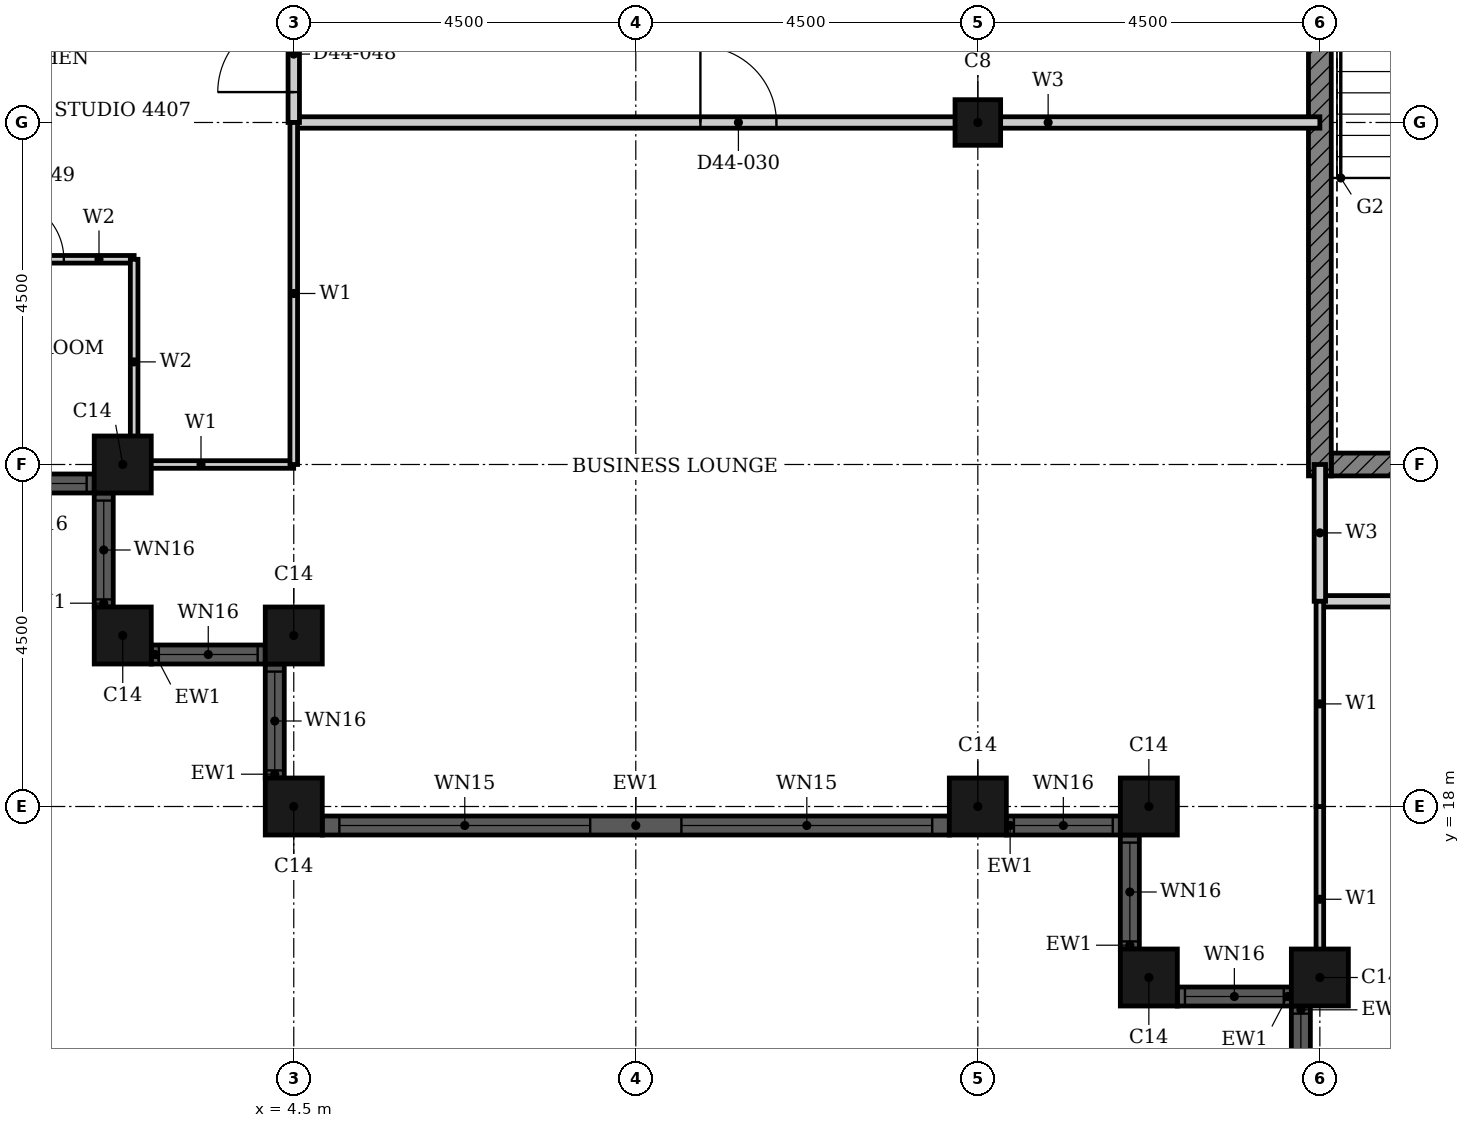
"""IFC4 building model, lengths in metres.
Left out: names, types, materials, properties, quantities, classifications, styles, units other than length and angle.
Written with IfcOpenShell. Run it as: python <this file> out.ifc"""

import sys

from ifc_helpers import new_model, si_unit, direction, frame, frame_2d, origin, origin_2d, place, context, subcontext, project, spatial, rectangle, hollow_rectangle, extrude, element, fill, save


model = new_model("IFC4")
c1 = context("Model", 3, precision=1e-05, world=origin(), true_north=direction((0.0, 1.0)))
c2 = subcontext(c1, "Body", "Model", "MODEL_VIEW")
j1 = project(units=[si_unit("LENGTHUNIT", "METRE"), si_unit("PLANEANGLEUNIT", "RADIAN")], contexts=[c1])
p1 = place(None, origin())
s1 = spatial("IfcSite", under=j1, at=p1, CompositionType="ELEMENT")
p2 = place(p1, origin())
s2 = spatial("IfcBuilding", under=s1, at=p2, CompositionType="ELEMENT")
p3 = place(p2, frame((0.0, 0.0, 176.5)))
s3 = spatial("IfcBuildingStorey", under=s2, at=p3, CompositionType="ELEMENT", Elevation=176.5)
for number, where, z_axis, x_axis in (
    (1, (2.25, 22.5, 0.0), (0.0, 0.0, 1.0), (1.0, 0.0, 0.0)),
    (2, (2.25, 20.25, 0.0), (0.0, 0.0, 1.0), (1.0, 0.0, 0.0)),
    (3, (4.5, 20.25, 0.0), (0.0, 0.0, 1.0), (1.0, 0.0, 0.0)),
    (4, (4.5, 18.0, 0.0), (0.0, 0.0, 1.0), (1.0, 0.0, 0.0)),
    (5, (13.5, 18.0, 0.0), (0.0, 0.0, 1.0), (1.0, 0.0, 0.0)),
    (6, (15.75, 18.0, 0.0), (0.0, 0.0, 1.0), (1.0, 0.0, 0.0)),
    (7, (15.75, 15.75, 0.0), (0.0, 0.0, 1.0), (1.0, 0.0, 0.0)),
    (8, (18.0, 15.75, 0.0), (0.0, 0.0, 1.0), (1.0, 0.0, 0.0)),
):
    element("IfcColumn", number, at=place(p3, frame(where, z_axis=z_axis, x_axis=x_axis)), inside=s3, PredefinedType="COLUMN", context=c2, shape_type="SweptSolid", body=[
        extrude(hollow_rectangle(XDim=0.75, YDim=0.75, WallThickness=0.024, at=origin_2d()), origin(), (0.0, 0.0, 1.0), 3.7),
    ])
p4 = place(p3, frame((13.5, 27.0, 0.0), z_axis=(0.0, 0.0, 1.0), x_axis=(1.0, 0.0, 0.0)))
e9 = element("IfcColumn", 9, at=p4, inside=s3, PredefinedType="COLUMN", context=c2, shape_type="SweptSolid", body=[
    extrude(hollow_rectangle(XDim=0.6, YDim=0.6, WallThickness=0.02, at=origin_2d()), origin(), (0.0, 0.0, 1.0), 3.7),
])
p5 = place(p3, frame((0.375, 22.25, 0.0), z_axis=(0.0, 0.0, 1.0), x_axis=(1.0, 0.0, 0.0)))
e10 = element("IfcWall", 10, at=p5, inside=s3, PredefinedType="SOLIDWALL", context=c2, shape_type="SweptSolid", body=[
    extrude(rectangle(XDim=1.5, YDim=0.25, at=frame_2d((0.75, 0.0))), origin(), (0.0, 0.0, 1.0), 3.7),
])
p6 = place(p5, frame((0.1, 0.0, 0.9)))
e11 = element("IfcOpeningElement", 11, at=p6, cuts=e10, PredefinedType="OPENING", context=c2, shape_type="SweptSolid", body=[
    extrude(rectangle(XDim=1.3, YDim=1.85, at=frame_2d((0.65, 0.925))), frame((0.0, 0.135, 0.0), z_axis=(0.0, -1.0, 0.0), x_axis=(1.0, 0.0, 0.0)), (0.0, 0.0, 1.0), 0.27),
])
p7 = place(p3, frame((2.0, 22.125, 0.0), z_axis=(0.0, 0.0, 1.0), x_axis=(0.0, -1.0, 0.0)))
e12 = element("IfcWall", 12, at=p7, inside=s3, PredefinedType="SOLIDWALL", context=c2, shape_type="SweptSolid", body=[
    extrude(rectangle(XDim=1.5, YDim=0.25, at=frame_2d((0.75, 0.0))), origin(), (0.0, 0.0, 1.0), 3.7),
])
p8 = place(p7, frame((0.1, 0.0, 0.9)))
e13 = element("IfcOpeningElement", 13, at=p8, cuts=e12, PredefinedType="OPENING", context=c2, shape_type="SweptSolid", body=[
    extrude(rectangle(XDim=1.3, YDim=1.85, at=frame_2d((0.65, 0.925))), frame((0.0, 0.135, 0.0), z_axis=(0.0, -1.0, 0.0), x_axis=(1.0, 0.0, 0.0)), (0.0, 0.0, 1.0), 0.27),
])
p9 = place(p3, frame((2.625, 20.0, 0.0), z_axis=(0.0, 0.0, 1.0), x_axis=(1.0, 0.0, 0.0)))
e14 = element("IfcWall", 14, at=p9, inside=s3, PredefinedType="SOLIDWALL", context=c2, shape_type="SweptSolid", body=[
    extrude(rectangle(XDim=1.5, YDim=0.25, at=frame_2d((0.75, 0.0))), origin(), (0.0, 0.0, 1.0), 3.7),
])
p10 = place(p9, frame((0.1, 0.0, 0.9)))
e15 = element("IfcOpeningElement", 15, at=p10, cuts=e14, PredefinedType="OPENING", context=c2, shape_type="SweptSolid", body=[
    extrude(rectangle(XDim=1.3, YDim=1.85, at=frame_2d((0.65, 0.925))), frame((0.0, 0.135, 0.0), z_axis=(0.0, -1.0, 0.0), x_axis=(1.0, 0.0, 0.0)), (0.0, 0.0, 1.0), 0.27),
])
p11 = place(p3, frame((4.25, 19.875, 0.0), z_axis=(0.0, 0.0, 1.0), x_axis=(0.0, -1.0, 0.0)))
e16 = element("IfcWall", 16, at=p11, inside=s3, PredefinedType="SOLIDWALL", context=c2, shape_type="SweptSolid", body=[
    extrude(rectangle(XDim=1.5, YDim=0.25, at=frame_2d((0.75, 0.0))), origin(), (0.0, 0.0, 1.0), 3.7),
])
p12 = place(p11, frame((0.1, 0.0, 0.9)))
e17 = element("IfcOpeningElement", 17, at=p12, cuts=e16, PredefinedType="OPENING", context=c2, shape_type="SweptSolid", body=[
    extrude(rectangle(XDim=1.3, YDim=1.85, at=frame_2d((0.65, 0.925))), frame((0.0, 0.135, 0.0), z_axis=(0.0, -1.0, 0.0), x_axis=(1.0, 0.0, 0.0)), (0.0, 0.0, 1.0), 0.27),
])
p13 = place(p3, frame((4.875, 17.75, 0.0), z_axis=(0.0, 0.0, 1.0), x_axis=(1.0, 0.0, 0.0)))
e18 = element("IfcWall", 18, at=p13, inside=s3, PredefinedType="SOLIDWALL", context=c2, shape_type="SweptSolid", body=[
    extrude(rectangle(XDim=8.25, YDim=0.25, at=frame_2d((4.125, 0.0))), origin(), (0.0, 0.0, 1.0), 3.7),
])
p14 = place(p13, frame((0.225, 0.0, 0.45)))
e19 = element("IfcOpeningElement", 19, at=p14, cuts=e18, PredefinedType="OPENING", context=c2, shape_type="SweptSolid", body=[
    extrude(rectangle(XDim=3.3, YDim=2.3, at=frame_2d((1.65, 1.15))), frame((0.0, 0.135, 0.0), z_axis=(0.0, -1.0, 0.0), x_axis=(1.0, 0.0, 0.0)), (0.0, 0.0, 1.0), 0.27),
])
p15 = place(p13, frame((4.725, 0.0, 0.45)))
e20 = element("IfcOpeningElement", 20, at=p15, cuts=e18, PredefinedType="OPENING", context=c2, shape_type="SweptSolid", body=[
    extrude(rectangle(XDim=3.3, YDim=2.3, at=frame_2d((1.65, 1.15))), frame((0.0, 0.135, 0.0), z_axis=(0.0, -1.0, 0.0), x_axis=(1.0, 0.0, 0.0)), (0.0, 0.0, 1.0), 0.27),
])
p16 = place(p3, frame((13.875, 17.75, 0.0), z_axis=(0.0, 0.0, 1.0), x_axis=(1.0, 0.0, 0.0)))
e21 = element("IfcWall", 21, at=p16, inside=s3, PredefinedType="SOLIDWALL", context=c2, shape_type="SweptSolid", body=[
    extrude(rectangle(XDim=1.5, YDim=0.25, at=frame_2d((0.75, 0.0))), origin(), (0.0, 0.0, 1.0), 3.7),
])
p17 = place(p16, frame((0.1, 0.0, 0.9)))
e22 = element("IfcOpeningElement", 22, at=p17, cuts=e21, PredefinedType="OPENING", context=c2, shape_type="SweptSolid", body=[
    extrude(rectangle(XDim=1.3, YDim=1.85, at=frame_2d((0.65, 0.925))), frame((0.0, 0.135, 0.0), z_axis=(0.0, -1.0, 0.0), x_axis=(1.0, 0.0, 0.0)), (0.0, 0.0, 1.0), 0.27),
])
p18 = place(p3, frame((15.5, 17.625, 0.0), z_axis=(0.0, 0.0, 1.0), x_axis=(0.0, -1.0, 0.0)))
e23 = element("IfcWall", 23, at=p18, inside=s3, PredefinedType="SOLIDWALL", context=c2, shape_type="SweptSolid", body=[
    extrude(rectangle(XDim=1.5, YDim=0.25, at=frame_2d((0.75, 0.0))), origin(), (0.0, 0.0, 1.0), 3.7),
])
p19 = place(p18, frame((0.1, 0.0, 0.9)))
e24 = element("IfcOpeningElement", 24, at=p19, cuts=e23, PredefinedType="OPENING", context=c2, shape_type="SweptSolid", body=[
    extrude(rectangle(XDim=1.3, YDim=1.85, at=frame_2d((0.65, 0.925))), frame((0.0, 0.135, 0.0), z_axis=(0.0, -1.0, 0.0), x_axis=(1.0, 0.0, 0.0)), (0.0, 0.0, 1.0), 0.27),
])
p20 = place(p3, frame((16.125, 15.5, 0.0), z_axis=(0.0, 0.0, 1.0), x_axis=(1.0, 0.0, 0.0)))
e25 = element("IfcWall", 25, at=p20, inside=s3, PredefinedType="SOLIDWALL", context=c2, shape_type="SweptSolid", body=[
    extrude(rectangle(XDim=1.5, YDim=0.25, at=frame_2d((0.75, 0.0))), origin(), (0.0, 0.0, 1.0), 3.7),
])
p21 = place(p20, frame((0.1, 0.0, 0.9)))
e26 = element("IfcOpeningElement", 26, at=p21, cuts=e25, PredefinedType="OPENING", context=c2, shape_type="SweptSolid", body=[
    extrude(rectangle(XDim=1.3, YDim=1.85, at=frame_2d((0.65, 0.925))), frame((0.0, 0.135, 0.0), z_axis=(0.0, -1.0, 0.0), x_axis=(1.0, 0.0, 0.0)), (0.0, 0.0, 1.0), 0.27),
])
p22 = place(p3, frame((17.75, 15.375, 0.0), z_axis=(0.0, 0.0, 1.0), x_axis=(0.0, -1.0, 0.0)))
e27 = element("IfcWall", 27, at=p22, inside=s3, PredefinedType="SOLIDWALL", context=c2, shape_type="SweptSolid", body=[
    extrude(rectangle(XDim=1.5, YDim=0.25, at=frame_2d((0.75, 0.0))), origin(), (0.0, 0.0, 1.0), 3.7),
])
p23 = place(p22, frame((0.1, 0.0, 0.9)))
e28 = element("IfcOpeningElement", 28, at=p23, cuts=e27, PredefinedType="OPENING", context=c2, shape_type="SweptSolid", body=[
    extrude(rectangle(XDim=1.3, YDim=1.85, at=frame_2d((0.65, 0.925))), frame((0.0, 0.135, 0.0), z_axis=(0.0, -1.0, 0.0), x_axis=(1.0, 0.0, 0.0)), (0.0, 0.0, 1.0), 0.27),
])
p24 = place(p3, frame((18.15, 22.5, 0.0), z_axis=(0.0, 0.0, 1.0), x_axis=(1.0, 0.0, 0.0)))
e29 = element("IfcWall", 29, at=p24, inside=s3, PredefinedType="SHEAR", context=c2, shape_type="SweptSolid", body=[
    extrude(rectangle(XDim=4.225, YDim=0.3, at=frame_2d((2.113, 0.0))), origin(), (0.0, 0.0, 1.0), 3.4),
])
p25 = place(p3, frame((18.0, 22.35, 0.0), z_axis=(0.0, 0.0, 1.0), x_axis=(0.0, 1.0, 0.0)))
e30 = element("IfcWall", 30, at=p25, inside=s3, PredefinedType="SHEAR", context=c2, shape_type="SweptSolid", body=[
    extrude(rectangle(XDim=9.3, YDim=0.3, at=frame_2d((4.65, 0.0))), origin(), (0.0, 0.0, 1.0), 3.4),
])
p26 = place(p3, frame((18.0, 20.7, 0.0), z_axis=(0.0, 0.0, 1.0), x_axis=(1.0, 0.0, 0.0)))
e31 = element("IfcWall", 31, at=p26, inside=s3, PredefinedType="PARTITIONING", context=c2, shape_type="SweptSolid", body=[
    extrude(rectangle(XDim=13.5, YDim=0.15, at=frame_2d((6.75, 0.0))), origin(), (0.0, 0.0, 1.0), 3.4),
])
p27 = place(p26, frame((6.25, 0.0, 0.0)))
e32 = element("IfcOpeningElement", 32, at=p27, cuts=e31, PredefinedType="OPENING", context=c2, shape_type="SweptSolid", body=[
    extrude(rectangle(XDim=1.0, YDim=2.1, at=frame_2d((0.5, 1.05))), frame((0.0, 0.085, 0.0), z_axis=(0.0, -1.0, 0.0), x_axis=(1.0, 0.0, 0.0)), (0.0, 0.0, 1.0), 0.17),
])
p28 = place(p3, frame((4.5, 27.0, 0.0), z_axis=(0.0, 0.0, 1.0), x_axis=(1.0, 0.0, 0.0)))
e33 = element("IfcWall", 33, at=p28, inside=s3, PredefinedType="PARTITIONING", context=c2, shape_type="SweptSolid", body=[
    extrude(rectangle(XDim=13.5, YDim=0.15, at=frame_2d((6.75, 0.0))), origin(), (0.0, 0.0, 1.0), 2.68),
])
p29 = place(p28, frame((5.35, 0.0, 0.0)))
e34 = element("IfcOpeningElement", 34, at=p29, cuts=e33, PredefinedType="OPENING", context=c2, shape_type="SweptSolid", body=[
    extrude(rectangle(XDim=1.0, YDim=2.1, at=frame_2d((0.5, 1.05))), frame((0.0, 0.085, 0.0), z_axis=(0.0, -1.0, 0.0), x_axis=(1.0, 0.0, 0.0)), (0.0, 0.0, 1.0), 0.17),
])
p30 = place(p3, frame((18.0, 20.7, 0.0), z_axis=(0.0, 0.0, 1.0), x_axis=(0.0, 1.0, 0.0)))
e35 = element("IfcWall", 35, at=p30, inside=s3, PredefinedType="PARTITIONING", context=c2, shape_type="SweptSolid", body=[
    extrude(rectangle(XDim=1.8, YDim=0.15, at=frame_2d((0.9, 0.0))), origin(), (0.0, 0.0, 1.0), 3.4),
])
p31 = place(p3, frame((4.5, 27.0, 0.0), z_axis=(0.0, 0.0, 1.0), x_axis=(0.0, 1.0, 0.0)))
e36 = element("IfcWall", 36, at=p31, inside=s3, PredefinedType="PARTITIONING", context=c2, shape_type="SweptSolid", body=[
    extrude(rectangle(XDim=1.8, YDim=0.15, at=frame_2d((0.9, 0.0))), origin(), (0.0, 0.0, 1.0), 3.4),
])
p32 = place(p31, frame((0.4, 0.0, 0.0)))
e37 = element("IfcOpeningElement", 37, at=p32, cuts=e36, PredefinedType="OPENING", context=c2, shape_type="SweptSolid", body=[
    extrude(rectangle(XDim=1.0, YDim=2.2, at=frame_2d((0.5, 1.1))), frame((0.0, 0.085, 0.0), z_axis=(0.0, -1.0, 0.0), x_axis=(1.0, 0.0, 0.0)), (0.0, 0.0, 1.0), 0.17),
])
p33 = place(p3, frame((2.06, 22.5, 0.0), z_axis=(0.0, 0.0, 1.0), x_axis=(1.0, 0.0, 0.0)))
e38 = element("IfcWall", 38, at=p33, inside=s3, PredefinedType="PARTITIONING", context=c2, shape_type="SweptSolid", body=[
    extrude(rectangle(XDim=2.439, YDim=0.1, at=frame_2d((1.219, 0.0))), origin(), (0.0, 0.0, 1.0), 2.68),
])
p34 = place(p3, frame((18.0, 15.56, 0.0), z_axis=(0.0, 0.0, 1.0), x_axis=(0.0, 1.0, 0.0)))
e39 = element("IfcWall", 39, at=p34, inside=s3, PredefinedType="PARTITIONING", context=c2, shape_type="SweptSolid", body=[
    extrude(rectangle(XDim=2.439, YDim=0.1, at=frame_2d((1.219, 0.0))), origin(), (0.0, 0.0, 1.0), 3.4),
])
p35 = place(p3, frame((18.0, 18.0, 0.0), z_axis=(0.0, 0.0, 1.0), x_axis=(0.0, 1.0, 0.0)))
e40 = element("IfcWall", 40, at=p35, inside=s3, PredefinedType="PARTITIONING", context=c2, shape_type="SweptSolid", body=[
    extrude(rectangle(XDim=2.7, YDim=0.1, at=frame_2d((1.35, 0.0))), origin(), (0.0, 0.0, 1.0), 3.4),
])
p36 = place(p3, frame((4.5, 22.5, 0.0), z_axis=(0.0, 0.0, 1.0), x_axis=(0.0, 1.0, 0.0)))
e41 = element("IfcWall", 41, at=p36, inside=s3, PredefinedType="PARTITIONING", context=c2, shape_type="SweptSolid", body=[
    extrude(rectangle(XDim=4.5, YDim=0.1, at=frame_2d((2.25, 0.0))), origin(), (0.0, 0.0, 1.0), 3.4),
])
p37 = place(p3, frame((-0.125, 25.2, 0.0), z_axis=(0.0, 0.0, 1.0), x_axis=(1.0, 0.0, 0.0)))
e42 = element("IfcWall", 42, at=p37, inside=s3, PredefinedType="PARTITIONING", context=c2, shape_type="SweptSolid", body=[
    extrude(rectangle(XDim=2.525, YDim=0.1, at=frame_2d((1.262, 0.0))), origin(), (0.0, 0.0, 1.0), 3.4),
])
p38 = place(p37, frame((0.8, 0.0, 0.0)))
e43 = element("IfcOpeningElement", 43, at=p38, cuts=e42, PredefinedType="OPENING", context=c2, shape_type="SweptSolid", body=[
    extrude(rectangle(XDim=0.8, YDim=2.1, at=frame_2d((0.4, 1.05))), frame((0.0, 0.06, 0.0), z_axis=(0.0, -1.0, 0.0), x_axis=(1.0, 0.0, 0.0)), (0.0, 0.0, 1.0), 0.12),
])
p39 = place(p3, frame((2.4, 22.5, 0.0), z_axis=(0.0, 0.0, 1.0), x_axis=(0.0, 1.0, 0.0)))
e44 = element("IfcWall", 44, at=p39, inside=s3, PredefinedType="PARTITIONING", context=c2, shape_type="SweptSolid", body=[
    extrude(rectangle(XDim=2.7, YDim=0.1, at=frame_2d((1.35, 0.0))), origin(), (0.0, 0.0, 1.0), 3.4),
])
p40 = place(p6, origin())
e45 = element("IfcWindow", 45, at=p40, inside=s3, PartitioningType="SINGLE_PANEL", PredefinedType="WINDOW", context=c2, shape_type="SweptSolid", body=[
    extrude(rectangle(XDim=1.3, YDim=1.85, at=frame_2d((0.65, 0.925))), frame((0.0, 0.03, 0.0), z_axis=(0.0, -1.0, 0.0), x_axis=(1.0, 0.0, 0.0)), (0.0, 0.0, 1.0), 0.06),
])
fill(e11, e45)
p41 = place(p8, origin())
e46 = element("IfcWindow", 46, at=p41, inside=s3, PartitioningType="SINGLE_PANEL", PredefinedType="WINDOW", context=c2, shape_type="SweptSolid", body=[
    extrude(rectangle(XDim=1.3, YDim=1.85, at=frame_2d((0.65, 0.925))), frame((0.0, 0.03, 0.0), z_axis=(0.0, -1.0, 0.0), x_axis=(1.0, 0.0, 0.0)), (0.0, 0.0, 1.0), 0.06),
])
fill(e13, e46)
p42 = place(p10, origin())
e47 = element("IfcWindow", 47, at=p42, inside=s3, PartitioningType="SINGLE_PANEL", PredefinedType="WINDOW", context=c2, shape_type="SweptSolid", body=[
    extrude(rectangle(XDim=1.3, YDim=1.85, at=frame_2d((0.65, 0.925))), frame((0.0, 0.03, 0.0), z_axis=(0.0, -1.0, 0.0), x_axis=(1.0, 0.0, 0.0)), (0.0, 0.0, 1.0), 0.06),
])
fill(e15, e47)
p43 = place(p12, origin())
e48 = element("IfcWindow", 48, at=p43, inside=s3, PartitioningType="SINGLE_PANEL", PredefinedType="WINDOW", context=c2, shape_type="SweptSolid", body=[
    extrude(rectangle(XDim=1.3, YDim=1.85, at=frame_2d((0.65, 0.925))), frame((0.0, 0.03, 0.0), z_axis=(0.0, -1.0, 0.0), x_axis=(1.0, 0.0, 0.0)), (0.0, 0.0, 1.0), 0.06),
])
fill(e17, e48)
p44 = place(p14, origin())
e49 = element("IfcWindow", 49, at=p44, inside=s3, PartitioningType="SINGLE_PANEL", PredefinedType="WINDOW", context=c2, shape_type="SweptSolid", body=[
    extrude(rectangle(XDim=3.3, YDim=2.3, at=frame_2d((1.65, 1.15))), frame((0.0, 0.03, 0.0), z_axis=(0.0, -1.0, 0.0), x_axis=(1.0, 0.0, 0.0)), (0.0, 0.0, 1.0), 0.06),
])
fill(e19, e49)
p45 = place(p15, origin())
e50 = element("IfcWindow", 50, at=p45, inside=s3, PartitioningType="SINGLE_PANEL", PredefinedType="WINDOW", context=c2, shape_type="SweptSolid", body=[
    extrude(rectangle(XDim=3.3, YDim=2.3, at=frame_2d((1.65, 1.15))), frame((0.0, 0.03, 0.0), z_axis=(0.0, -1.0, 0.0), x_axis=(1.0, 0.0, 0.0)), (0.0, 0.0, 1.0), 0.06),
])
fill(e20, e50)
p46 = place(p17, origin())
e51 = element("IfcWindow", 51, at=p46, inside=s3, PartitioningType="SINGLE_PANEL", PredefinedType="WINDOW", context=c2, shape_type="SweptSolid", body=[
    extrude(rectangle(XDim=1.3, YDim=1.85, at=frame_2d((0.65, 0.925))), frame((0.0, 0.03, 0.0), z_axis=(0.0, -1.0, 0.0), x_axis=(1.0, 0.0, 0.0)), (0.0, 0.0, 1.0), 0.06),
])
fill(e22, e51)
p47 = place(p19, origin())
e52 = element("IfcWindow", 52, at=p47, inside=s3, PartitioningType="SINGLE_PANEL", PredefinedType="WINDOW", context=c2, shape_type="SweptSolid", body=[
    extrude(rectangle(XDim=1.3, YDim=1.85, at=frame_2d((0.65, 0.925))), frame((0.0, 0.03, 0.0), z_axis=(0.0, -1.0, 0.0), x_axis=(1.0, 0.0, 0.0)), (0.0, 0.0, 1.0), 0.06),
])
fill(e24, e52)
p48 = place(p21, origin())
e53 = element("IfcWindow", 53, at=p48, inside=s3, PartitioningType="SINGLE_PANEL", PredefinedType="WINDOW", context=c2, shape_type="SweptSolid", body=[
    extrude(rectangle(XDim=1.3, YDim=1.85, at=frame_2d((0.65, 0.925))), frame((0.0, 0.03, 0.0), z_axis=(0.0, -1.0, 0.0), x_axis=(1.0, 0.0, 0.0)), (0.0, 0.0, 1.0), 0.06),
])
fill(e26, e53)
p49 = place(p23, origin())
e54 = element("IfcWindow", 54, at=p49, inside=s3, PartitioningType="SINGLE_PANEL", PredefinedType="WINDOW", context=c2, shape_type="SweptSolid", body=[
    extrude(rectangle(XDim=1.3, YDim=1.85, at=frame_2d((0.65, 0.925))), frame((0.0, 0.03, 0.0), z_axis=(0.0, -1.0, 0.0), x_axis=(1.0, 0.0, 0.0)), (0.0, 0.0, 1.0), 0.06),
])
fill(e28, e54)
p50 = place(p29, origin())
e55 = element("IfcDoor", 55, at=p50, inside=s3, OperationType="SINGLE_SWING_LEFT", PredefinedType="DOOR", context=c2, shape_type="SweptSolid", body=[
    extrude(rectangle(XDim=1.0, YDim=2.1, at=frame_2d((0.5, 1.05))), frame((0.0, 0.025, 0.0), z_axis=(0.0, -1.0, 0.0), x_axis=(1.0, 0.0, 0.0)), (0.0, 0.0, 1.0), 0.05),
])
fill(e34, e55)
p51 = place(p32, origin())
e56 = element("IfcDoor", 56, at=p51, inside=s3, OperationType="SINGLE_SWING_LEFT", PredefinedType="DOOR", context=c2, shape_type="SweptSolid", body=[
    extrude(rectangle(XDim=1.0, YDim=2.2, at=frame_2d((0.5, 1.1))), frame((0.0, 0.025, 0.0), z_axis=(0.0, -1.0, 0.0), x_axis=(1.0, 0.0, 0.0)), (0.0, 0.0, 1.0), 0.05),
])
fill(e37, e56)
p52 = place(p38, origin())
e57 = element("IfcDoor", 57, at=p52, inside=s3, OperationType="SINGLE_SWING_RIGHT", PredefinedType="DOOR", context=c2, shape_type="SweptSolid", body=[
    extrude(rectangle(XDim=0.8, YDim=2.1, at=frame_2d((0.4, 1.05))), frame((0.0, 0.025, 0.0), z_axis=(0.0, -1.0, 0.0), x_axis=(1.0, 0.0, 0.0)), (0.0, 0.0, 1.0), 0.05),
])
fill(e43, e57)
save(model, sys.argv[1])
